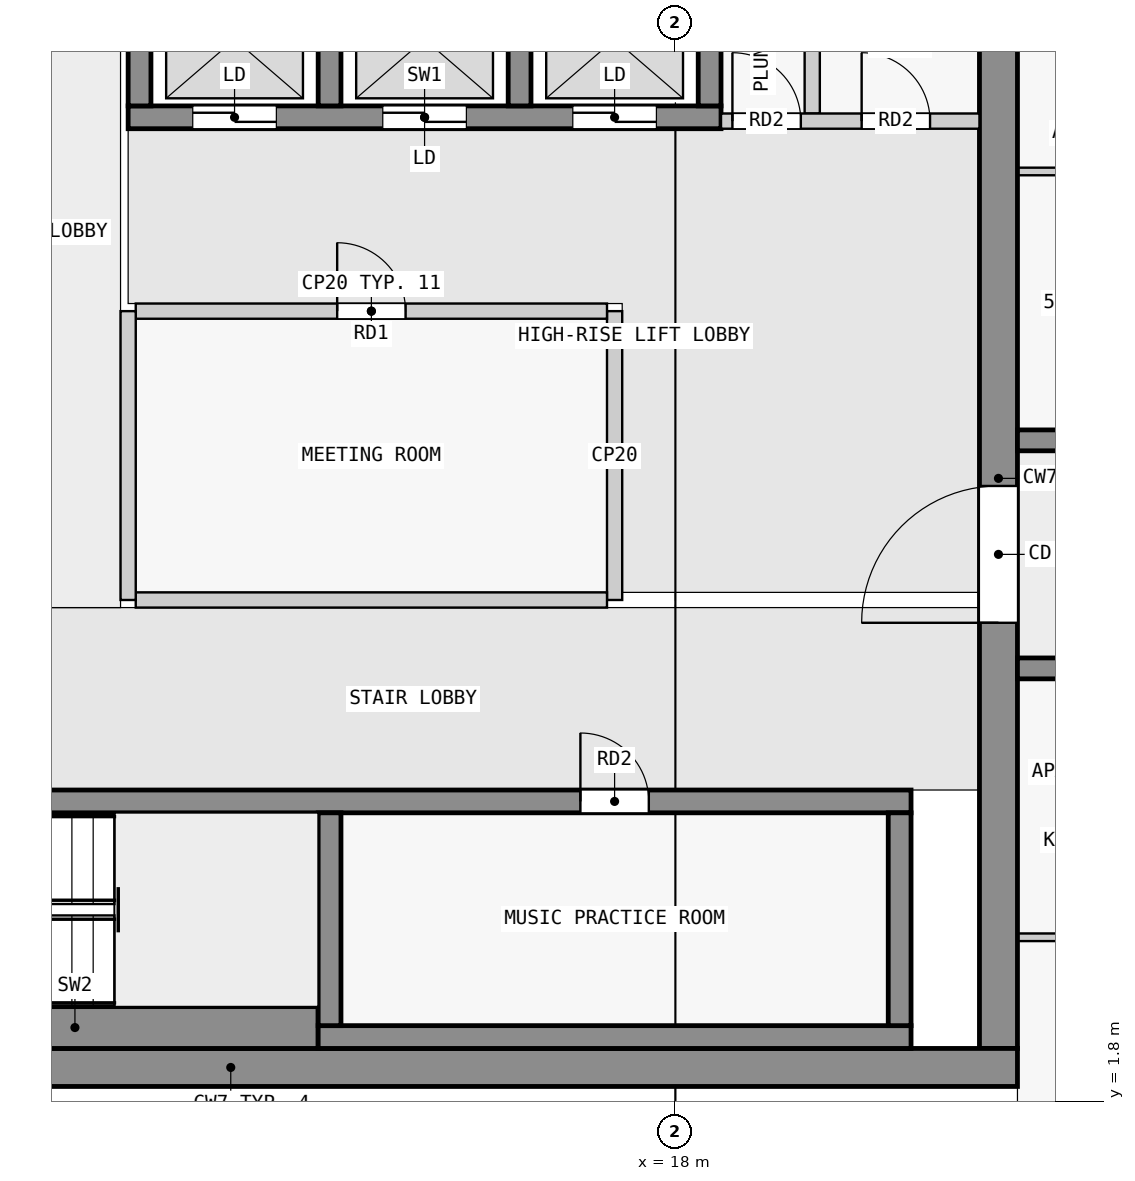
"""IFC4 building model, lengths in metres.
Left out: names, types, materials, properties, quantities, classifications, styles, units other than length and angle.
Written with IfcOpenShell. Run it as: python <this file> out.ifc"""

import sys

from ifc_helpers import new_model, si_unit, direction, frame, frame_2d, origin, place, context, subcontext, project, spatial, rectangle, extrude, element, fill, save


model = new_model("IFC4")
c1 = context("Model", 3, precision=1e-05, world=origin(), true_north=direction((0.0, 1.0)))
c2 = subcontext(c1, "Body", "Model", "MODEL_VIEW")
j1 = project(units=[si_unit("LENGTHUNIT", "METRE"), si_unit("PLANEANGLEUNIT", "RADIAN")], contexts=[c1])
p1 = place(None, origin())
s1 = spatial("IfcSite", under=j1, at=p1, CompositionType="ELEMENT")
p2 = place(p1, origin())
s2 = spatial("IfcBuilding", under=s1, at=p2, CompositionType="ELEMENT")
p3 = place(p2, frame((0.0, 0.0, 218.9)))
s3 = spatial("IfcBuildingStorey", under=s2, at=p3, CompositionType="ELEMENT", Elevation=218.9)
p4 = place(p3, frame((1.8, 2.25, 0.0), z_axis=(0.0, 0.0, 1.0), x_axis=(1.0, 0.0, 0.0)))
e1 = element("IfcWall", 1, at=p4, inside=s3, PredefinedType="SHEAR", context=c2, shape_type="SweptSolid", body=[
    extrude(rectangle(XDim=20.7, YDim=0.5, at=frame_2d((10.35, 0.0))), origin(), (0.0, 0.0, 1.0), 3.25),
])
p5 = place(p3, frame((22.25, 2.5, 0.0), z_axis=(0.0, 0.0, 1.0), x_axis=(0.0, 1.0, 0.0)))
e2 = element("IfcWall", 2, at=p5, inside=s3, PredefinedType="SHEAR", context=c2, shape_type="SweptSolid", body=[
    extrude(rectangle(XDim=15.0, YDim=0.5, at=frame_2d((7.5, 0.0))), origin(), (0.0, 0.0, 1.0), 3.25),
])
p6 = place(p5, frame((5.6, 0.0, 0.0)))
e3 = element("IfcOpeningElement", 3, at=p6, cuts=e2, PredefinedType="OPENING", context=c2, shape_type="SweptSolid", body=[
    extrude(rectangle(XDim=1.8, YDim=2.1, at=frame_2d((0.9, 1.05))), frame((0.0, 0.26, 0.0), z_axis=(0.0, -1.0, 0.0), x_axis=(1.0, 0.0, 0.0)), (0.0, 0.0, 1.0), 0.52),
])
p7 = place(p3, frame((6.9, 2.775, 0.0), z_axis=(0.0, 0.0, 1.0), x_axis=(1.0, 0.0, 0.0)))
e4 = element("IfcWall", 4, at=p7, inside=s3, PredefinedType="SHEAR", context=c2, shape_type="SweptSolid", body=[
    extrude(rectangle(XDim=6.4, YDim=0.55, at=frame_2d((3.2, 0.0))), origin(), (0.0, 0.0, 1.0), 3.25),
])
p8 = place(p3, frame((13.3, 2.65, 0.0), z_axis=(0.0, 0.0, 1.0), x_axis=(1.0, 0.0, 0.0)))
e5 = element("IfcWall", 5, at=p8, inside=s3, PredefinedType="SHEAR", context=c2, shape_type="SweptSolid", body=[
    extrude(rectangle(XDim=7.8, YDim=0.3, at=frame_2d((3.9, 0.0))), origin(), (0.0, 0.0, 1.0), 3.25),
])
for number, where, z_axis, x_axis in (
    (6, (13.45, 2.8, 0.0), (0.0, 0.0, 1.0), (0.0, 1.0, 0.0)),
    (7, (20.95, 2.8, 0.0), (0.0, 0.0, 1.0), (0.0, 1.0, 0.0)),
):
    element("IfcWall", number, at=place(p3, frame(where, z_axis=z_axis, x_axis=x_axis)), inside=s3, PredefinedType="SHEAR", context=c2, shape_type="SweptSolid", body=[
        extrude(rectangle(XDim=2.8, YDim=0.3, at=frame_2d((1.4, 0.0))), origin(), (0.0, 0.0, 1.0), 3.25),
    ])
p9 = place(p3, frame((2.3, 5.75, 0.0), z_axis=(0.0, 0.0, 1.0), x_axis=(1.0, 0.0, 0.0)))
e8 = element("IfcWall", 8, at=p9, inside=s3, PredefinedType="SHEAR", context=c2, shape_type="SweptSolid", body=[
    extrude(rectangle(XDim=18.8, YDim=0.3, at=frame_2d((9.4, 0.0))), origin(), (0.0, 0.0, 1.0), 3.25),
])
p10 = place(p9, frame((4.65, 0.0, 0.0)))
e9 = element("IfcOpeningElement", 9, at=p10, cuts=e8, PredefinedType="OPENING", context=c2, shape_type="SweptSolid", body=[
    extrude(rectangle(XDim=1.1, YDim=2.1, at=frame_2d((0.55, 1.05))), frame((0.0, 0.16, 0.0), z_axis=(0.0, -1.0, 0.0), x_axis=(1.0, 0.0, 0.0)), (0.0, 0.0, 1.0), 0.32),
])
p11 = place(p9, frame((0.45, 0.0, 0.0)))
e10 = element("IfcOpeningElement", 10, at=p11, cuts=e8, PredefinedType="OPENING", context=c2, shape_type="SweptSolid", body=[
    extrude(rectangle(XDim=1.1, YDim=2.1, at=frame_2d((0.55, 1.05))), frame((0.0, 0.16, 0.0), z_axis=(0.0, -1.0, 0.0), x_axis=(1.0, 0.0, 0.0)), (0.0, 0.0, 1.0), 0.32),
])
p12 = place(p9, frame((2.75, 0.0, 0.0)))
e11 = element("IfcOpeningElement", 11, at=p12, cuts=e8, PredefinedType="OPENING", context=c2, shape_type="SweptSolid", body=[
    extrude(rectangle(XDim=1.1, YDim=2.1, at=frame_2d((0.55, 1.05))), frame((0.0, 0.16, 0.0), z_axis=(0.0, -1.0, 0.0), x_axis=(1.0, 0.0, 0.0)), (0.0, 0.0, 1.0), 0.32),
])
p13 = place(p9, frame((14.45, 0.0, 0.0)))
e12 = element("IfcOpeningElement", 12, at=p13, cuts=e8, PredefinedType="OPENING", context=c2, shape_type="SweptSolid", body=[
    extrude(rectangle(XDim=0.9, YDim=2.1, at=frame_2d((0.45, 1.05))), frame((0.0, 0.16, 0.0), z_axis=(0.0, -1.0, 0.0), x_axis=(1.0, 0.0, 0.0)), (0.0, 0.0, 1.0), 0.32),
])
p14 = place(p3, frame((10.8, 14.75, 0.0), z_axis=(0.0, 0.0, 1.0), x_axis=(1.0, 0.0, 0.0)))
e13 = element("IfcWall", 13, at=p14, inside=s3, PredefinedType="SHEAR", context=c2, shape_type="SweptSolid", body=[
    extrude(rectangle(XDim=7.8, YDim=0.3, at=frame_2d((3.9, 0.0))), origin(), (0.0, 0.0, 1.0), 3.25),
])
p15 = place(p14, frame((0.85, 0.0, 0.0)))
e14 = element("IfcOpeningElement", 14, at=p15, cuts=e13, PredefinedType="OPENING", context=c2, shape_type="SweptSolid", body=[
    extrude(rectangle(XDim=1.1, YDim=2.1, at=frame_2d((0.55, 1.05))), frame((0.0, 0.16, 0.0), z_axis=(0.0, -1.0, 0.0), x_axis=(1.0, 0.0, 0.0)), (0.0, 0.0, 1.0), 0.32),
])
p16 = place(p14, frame((3.35, 0.0, 0.0)))
e15 = element("IfcOpeningElement", 15, at=p16, cuts=e13, PredefinedType="OPENING", context=c2, shape_type="SweptSolid", body=[
    extrude(rectangle(XDim=1.1, YDim=2.1, at=frame_2d((0.55, 1.05))), frame((0.0, 0.16, 0.0), z_axis=(0.0, -1.0, 0.0), x_axis=(1.0, 0.0, 0.0)), (0.0, 0.0, 1.0), 0.32),
])
p17 = place(p14, frame((5.85, 0.0, 0.0)))
e16 = element("IfcOpeningElement", 16, at=p17, cuts=e13, PredefinedType="OPENING", context=c2, shape_type="SweptSolid", body=[
    extrude(rectangle(XDim=1.1, YDim=2.1, at=frame_2d((0.55, 1.05))), frame((0.0, 0.16, 0.0), z_axis=(0.0, -1.0, 0.0), x_axis=(1.0, 0.0, 0.0)), (0.0, 0.0, 1.0), 0.32),
])
for number, where, z_axis, x_axis in (
    (17, (10.95, 14.9, 0.0), (0.0, 0.0, 1.0), (0.0, 1.0, 0.0)),
    (18, (13.45, 14.9, 0.0), (0.0, 0.0, 1.0), (0.0, 1.0, 0.0)),
    (19, (15.95, 14.9, 0.0), (0.0, 0.0, 1.0), (0.0, 1.0, 0.0)),
    (20, (18.45, 14.9, 0.0), (0.0, 0.0, 1.0), (0.0, 1.0, 0.0)),
):
    element("IfcWall", number, at=place(p3, frame(where, z_axis=z_axis, x_axis=x_axis)), inside=s3, PredefinedType="SHEAR", context=c2, shape_type="SweptSolid", body=[
        extrude(rectangle(XDim=2.0, YDim=0.3, at=frame_2d((1.0, 0.0))), origin(), (0.0, 0.0, 1.0), 3.25),
    ])
p18 = place(p3, frame((22.5, 7.5, 0.0), z_axis=(0.0, 0.0, 1.0), x_axis=(1.0, 0.0, 0.0)))
e21 = element("IfcWall", 21, at=p18, inside=s3, PredefinedType="SHEAR", context=c2, shape_type="SweptSolid", body=[
    extrude(rectangle(XDim=22.5, YDim=0.275, at=frame_2d((11.25, 0.0))), origin(), (0.0, 0.0, 1.0), 3.25),
])
p19 = place(p18, frame((4.05, 0.0, 0.0)))
e22 = element("IfcOpeningElement", 22, at=p19, cuts=e21, PredefinedType="OPENING", context=c2, shape_type="SweptSolid", body=[
    extrude(rectangle(XDim=1.0, YDim=2.1, at=frame_2d((0.5, 1.05))), frame((0.0, 0.147, 0.0), z_axis=(0.0, -1.0, 0.0), x_axis=(1.0, 0.0, 0.0)), (0.0, 0.0, 1.0), 0.295),
])
p20 = place(p18, frame((10.75, 0.0, 0.0)))
e23 = element("IfcOpeningElement", 23, at=p20, cuts=e21, PredefinedType="OPENING", context=c2, shape_type="SweptSolid", body=[
    extrude(rectangle(XDim=1.0, YDim=2.1, at=frame_2d((0.5, 1.05))), frame((0.0, 0.147, 0.0), z_axis=(0.0, -1.0, 0.0), x_axis=(1.0, 0.0, 0.0)), (0.0, 0.0, 1.0), 0.295),
])
p21 = place(p18, frame((15.25, 0.0, 0.0)))
e24 = element("IfcOpeningElement", 24, at=p21, cuts=e21, PredefinedType="OPENING", context=c2, shape_type="SweptSolid", body=[
    extrude(rectangle(XDim=1.0, YDim=2.1, at=frame_2d((0.5, 1.05))), frame((0.0, 0.147, 0.0), z_axis=(0.0, -1.0, 0.0), x_axis=(1.0, 0.0, 0.0)), (0.0, 0.0, 1.0), 0.295),
])
p22 = place(p18, frame((18.75, 0.0, 0.0)))
e25 = element("IfcOpeningElement", 25, at=p22, cuts=e21, PredefinedType="OPENING", context=c2, shape_type="SweptSolid", body=[
    extrude(rectangle(XDim=0.9, YDim=2.1, at=frame_2d((0.45, 1.05))), frame((0.0, 0.147, 0.0), z_axis=(0.0, -1.0, 0.0), x_axis=(1.0, 0.0, 0.0)), (0.0, 0.0, 1.0), 0.295),
])
p23 = place(p18, frame((20.95, 0.0, 0.0)))
e26 = element("IfcOpeningElement", 26, at=p23, cuts=e21, PredefinedType="OPENING", context=c2, shape_type="SweptSolid", body=[
    extrude(rectangle(XDim=1.0, YDim=2.1, at=frame_2d((0.5, 1.05))), frame((0.0, 0.147, 0.0), z_axis=(0.0, -1.0, 0.0), x_axis=(1.0, 0.0, 0.0)), (0.0, 0.0, 1.0), 0.295),
])
p24 = place(p3, frame((22.5, 10.5, 0.0), z_axis=(0.0, 0.0, 1.0), x_axis=(1.0, 0.0, 0.0)))
e27 = element("IfcWall", 27, at=p24, inside=s3, PredefinedType="SHEAR", context=c2, shape_type="SweptSolid", body=[
    extrude(rectangle(XDim=22.5, YDim=0.275, at=frame_2d((11.25, 0.0))), origin(), (0.0, 0.0, 1.0), 3.25),
])
p25 = place(p24, frame((1.75, 0.0, 0.0)))
e28 = element("IfcOpeningElement", 28, at=p25, cuts=e27, PredefinedType="OPENING", context=c2, shape_type="SweptSolid", body=[
    extrude(rectangle(XDim=1.0, YDim=2.1, at=frame_2d((0.5, 1.05))), frame((0.0, 0.147, 0.0), z_axis=(0.0, -1.0, 0.0), x_axis=(1.0, 0.0, 0.0)), (0.0, 0.0, 1.0), 0.295),
])
p26 = place(p24, frame((5.85, 0.0, 0.0)))
e29 = element("IfcOpeningElement", 29, at=p26, cuts=e27, PredefinedType="OPENING", context=c2, shape_type="SweptSolid", body=[
    extrude(rectangle(XDim=1.8, YDim=2.1, at=frame_2d((0.9, 1.05))), frame((0.0, 0.147, 0.0), z_axis=(0.0, -1.0, 0.0), x_axis=(1.0, 0.0, 0.0)), (0.0, 0.0, 1.0), 0.295),
])
p27 = place(p24, frame((10.75, 0.0, 0.0)))
e30 = element("IfcOpeningElement", 30, at=p27, cuts=e27, PredefinedType="OPENING", context=c2, shape_type="SweptSolid", body=[
    extrude(rectangle(XDim=1.0, YDim=2.1, at=frame_2d((0.5, 1.05))), frame((0.0, 0.147, 0.0), z_axis=(0.0, -1.0, 0.0), x_axis=(1.0, 0.0, 0.0)), (0.0, 0.0, 1.0), 0.295),
])
p28 = place(p24, frame((16.85, 0.0, 0.0)))
e31 = element("IfcOpeningElement", 31, at=p28, cuts=e27, PredefinedType="OPENING", context=c2, shape_type="SweptSolid", body=[
    extrude(rectangle(XDim=1.0, YDim=2.1, at=frame_2d((0.5, 1.05))), frame((0.0, 0.147, 0.0), z_axis=(0.0, -1.0, 0.0), x_axis=(1.0, 0.0, 0.0)), (0.0, 0.0, 1.0), 0.295),
])
p29 = place(p3, frame((10.8, 8.4, 0.0), z_axis=(0.0, 0.0, 1.0), x_axis=(0.0, 1.0, 0.0)))
e32 = element("IfcWall", 32, at=p29, inside=s3, PredefinedType="PARTITIONING", context=c2, shape_type="SweptSolid", body=[
    extrude(rectangle(XDim=3.8, YDim=0.2, at=frame_2d((1.9, 0.0))), origin(), (0.0, 0.0, 1.0), 3.25),
])
p30 = place(p3, frame((10.9, 8.4, 0.0), z_axis=(0.0, 0.0, 1.0), x_axis=(1.0, 0.0, 0.0)))
e33 = element("IfcWall", 33, at=p30, inside=s3, PredefinedType="PARTITIONING", context=c2, shape_type="SweptSolid", body=[
    extrude(rectangle(XDim=6.2, YDim=0.2, at=frame_2d((3.1, 0.0))), origin(), (0.0, 0.0, 1.0), 3.25),
])
p31 = place(p3, frame((17.2, 8.4, 0.0), z_axis=(0.0, 0.0, 1.0), x_axis=(0.0, 1.0, 0.0)))
e34 = element("IfcWall", 34, at=p31, inside=s3, PredefinedType="PARTITIONING", context=c2, shape_type="SweptSolid", body=[
    extrude(rectangle(XDim=3.8, YDim=0.2, at=frame_2d((1.9, 0.0))), origin(), (0.0, 0.0, 1.0), 3.25),
])
p32 = place(p3, frame((10.9, 12.2, 0.0), z_axis=(0.0, 0.0, 1.0), x_axis=(1.0, 0.0, 0.0)))
e35 = element("IfcWall", 35, at=p32, inside=s3, PredefinedType="PARTITIONING", context=c2, shape_type="SweptSolid", body=[
    extrude(rectangle(XDim=6.2, YDim=0.2, at=frame_2d((3.1, 0.0))), origin(), (0.0, 0.0, 1.0), 3.25),
])
p33 = place(p32, frame((2.65, 0.0, 0.0)))
e36 = element("IfcOpeningElement", 36, at=p33, cuts=e35, PredefinedType="OPENING", context=c2, shape_type="SweptSolid", body=[
    extrude(rectangle(XDim=0.9, YDim=2.1, at=frame_2d((0.45, 1.05))), frame((0.0, 0.11, 0.0), z_axis=(0.0, -1.0, 0.0), x_axis=(1.0, 0.0, 0.0)), (0.0, 0.0, 1.0), 0.22),
])
p34 = place(p3, frame((18.6, 14.7, 0.0), z_axis=(0.0, 0.0, 1.0), x_axis=(1.0, 0.0, 0.0)))
e37 = element("IfcWall", 37, at=p34, inside=s3, PredefinedType="PARTITIONING", context=c2, shape_type="SweptSolid", body=[
    extrude(rectangle(XDim=3.4, YDim=0.2, at=frame_2d((1.7, 0.0))), origin(), (0.0, 0.0, 1.0), 3.25),
])
p35 = place(p34, frame((0.15, 0.0, 0.0)))
e38 = element("IfcOpeningElement", 38, at=p35, cuts=e37, PredefinedType="OPENING", context=c2, shape_type="SweptSolid", body=[
    extrude(rectangle(XDim=0.9, YDim=2.1, at=frame_2d((0.45, 1.05))), frame((0.0, 0.11, 0.0), z_axis=(0.0, -1.0, 0.0), x_axis=(1.0, 0.0, 0.0)), (0.0, 0.0, 1.0), 0.22),
])
p36 = place(p34, frame((1.85, 0.0, 0.0)))
e39 = element("IfcOpeningElement", 39, at=p36, cuts=e37, PredefinedType="OPENING", context=c2, shape_type="SweptSolid", body=[
    extrude(rectangle(XDim=0.9, YDim=2.1, at=frame_2d((0.45, 1.05))), frame((0.0, 0.11, 0.0), z_axis=(0.0, -1.0, 0.0), x_axis=(1.0, 0.0, 0.0)), (0.0, 0.0, 1.0), 0.22),
])
p37 = place(p3, frame((19.8, 14.8, 0.0), z_axis=(0.0, 0.0, 1.0), x_axis=(0.0, 1.0, 0.0)))
e40 = element("IfcWall", 40, at=p37, inside=s3, PredefinedType="PARTITIONING", context=c2, shape_type="SweptSolid", body=[
    extrude(rectangle(XDim=2.7, YDim=0.2, at=frame_2d((1.35, 0.0))), origin(), (0.0, 0.0, 1.0), 3.25),
])
p38 = place(p3, frame((22.5, 3.962, 0.0), z_axis=(0.0, 0.0, 1.0), x_axis=(1.0, 0.0, 0.0)))
e41 = element("IfcWall", 41, at=p38, inside=s3, PredefinedType="PARTITIONING", context=c2, shape_type="SweptSolid", body=[
    extrude(rectangle(XDim=1.75, YDim=0.1, at=frame_2d((0.875, 0.0))), origin(), (0.0, 0.0, 1.0), 3.25),
])
p39 = place(p3, frame((23.95, 14.038, 0.0), z_axis=(0.0, 0.0, 1.0), x_axis=(-1.0, 0.0, 0.0)))
e42 = element("IfcWall", 42, at=p39, inside=s3, PredefinedType="PARTITIONING", context=c2, shape_type="SweptSolid", body=[
    extrude(rectangle(XDim=1.45, YDim=0.1, at=frame_2d((0.725, 0.0))), origin(), (0.0, 0.0, 1.0), 3.25),
])
p40 = place(p33, origin())
e43 = element("IfcDoor", 43, at=p40, inside=s3, OperationType="SINGLE_SWING_LEFT", PredefinedType="DOOR", context=c2, shape_type="SweptSolid", body=[
    extrude(rectangle(XDim=0.9, YDim=2.1, at=frame_2d((0.45, 1.05))), frame((0.0, 0.025, 0.0), z_axis=(0.0, -1.0, 0.0), x_axis=(1.0, 0.0, 0.0)), (0.0, 0.0, 1.0), 0.05),
])
fill(e36, e43)
p41 = place(p15, origin())
e44 = element("IfcDoor", 44, at=p41, inside=s3, OperationType="DOUBLE_DOOR_SLIDING", PredefinedType="DOOR", context=c2, shape_type="SweptSolid", body=[
    extrude(rectangle(XDim=1.1, YDim=2.1, at=frame_2d((0.55, 1.05))), frame((0.0, 0.025, 0.0), z_axis=(0.0, -1.0, 0.0), x_axis=(1.0, 0.0, 0.0)), (0.0, 0.0, 1.0), 0.05),
])
fill(e14, e44)
p42 = place(p16, origin())
e45 = element("IfcDoor", 45, at=p42, inside=s3, OperationType="DOUBLE_DOOR_SLIDING", PredefinedType="DOOR", context=c2, shape_type="SweptSolid", body=[
    extrude(rectangle(XDim=1.1, YDim=2.1, at=frame_2d((0.55, 1.05))), frame((0.0, 0.025, 0.0), z_axis=(0.0, -1.0, 0.0), x_axis=(1.0, 0.0, 0.0)), (0.0, 0.0, 1.0), 0.05),
])
fill(e15, e45)
p43 = place(p17, origin())
e46 = element("IfcDoor", 46, at=p43, inside=s3, OperationType="DOUBLE_DOOR_SLIDING", PredefinedType="DOOR", context=c2, shape_type="SweptSolid", body=[
    extrude(rectangle(XDim=1.1, YDim=2.1, at=frame_2d((0.55, 1.05))), frame((0.0, 0.025, 0.0), z_axis=(0.0, -1.0, 0.0), x_axis=(1.0, 0.0, 0.0)), (0.0, 0.0, 1.0), 0.05),
])
fill(e16, e46)
p44 = place(p6, origin())
e47 = element("IfcDoor", 47, at=p44, inside=s3, OperationType="DOUBLE_DOOR_SINGLE_SWING", PredefinedType="DOOR", context=c2, shape_type="SweptSolid", body=[
    extrude(rectangle(XDim=1.8, YDim=2.1, at=frame_2d((0.9, 1.05))), frame((0.0, 0.025, 0.0), z_axis=(0.0, -1.0, 0.0), x_axis=(1.0, 0.0, 0.0)), (0.0, 0.0, 1.0), 0.05),
])
fill(e3, e47)
p45 = place(p35, origin())
e48 = element("IfcDoor", 48, at=p45, inside=s3, OperationType="SINGLE_SWING_LEFT", PredefinedType="DOOR", context=c2, shape_type="SweptSolid", body=[
    extrude(rectangle(XDim=0.9, YDim=2.1, at=frame_2d((0.45, 1.05))), frame((0.0, 0.025, 0.0), z_axis=(0.0, -1.0, 0.0), x_axis=(1.0, 0.0, 0.0)), (0.0, 0.0, 1.0), 0.05),
])
fill(e38, e48)
p46 = place(p36, origin())
e49 = element("IfcDoor", 49, at=p46, inside=s3, OperationType="SINGLE_SWING_LEFT", PredefinedType="DOOR", context=c2, shape_type="SweptSolid", body=[
    extrude(rectangle(XDim=0.9, YDim=2.1, at=frame_2d((0.45, 1.05))), frame((0.0, 0.025, 0.0), z_axis=(0.0, -1.0, 0.0), x_axis=(1.0, 0.0, 0.0)), (0.0, 0.0, 1.0), 0.05),
])
fill(e39, e49)
p47 = place(p13, origin())
e50 = element("IfcDoor", 50, at=p47, inside=s3, OperationType="SINGLE_SWING_LEFT", PredefinedType="DOOR", context=c2, shape_type="SweptSolid", body=[
    extrude(rectangle(XDim=0.9, YDim=2.1, at=frame_2d((0.45, 1.05))), frame((0.0, 0.025, 0.0), z_axis=(0.0, -1.0, 0.0), x_axis=(1.0, 0.0, 0.0)), (0.0, 0.0, 1.0), 0.05),
])
fill(e12, e50)
save(model, sys.argv[1])
